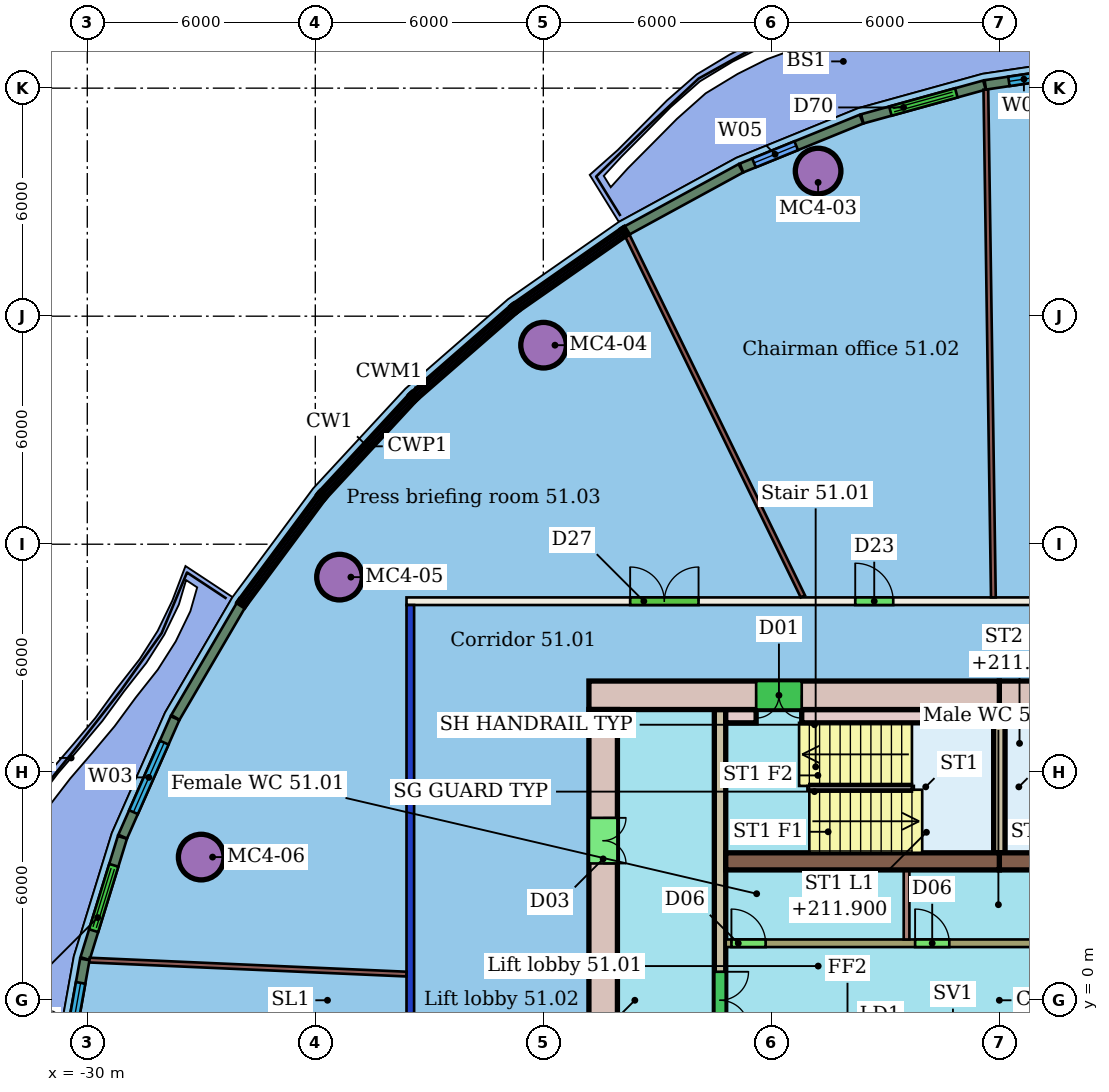
"""IFC4 building model, lengths in metres.
Left out: names, types, materials, properties, quantities, classifications, styles, units other than length and angle.
Written with IfcOpenShell. Run it as: python <this file> out.ifc"""

import sys

from ifc_helpers import new_model, si_unit, direction, frame, frame_2d, origin, origin_2d, place, context, subcontext, project, spatial, rectangle, hollow_circle, extrude, element, fill, save


model = new_model("IFC4")
c1 = context("Model", 3, precision=1e-05, world=origin(), true_north=direction((0.0, 1.0)))
c2 = subcontext(c1, "Body", "Model", "MODEL_VIEW")
j1 = project(units=[si_unit("LENGTHUNIT", "METRE"), si_unit("PLANEANGLEUNIT", "RADIAN")], contexts=[c1])
p1 = place(None, origin())
s1 = spatial("IfcSite", under=j1, at=p1, CompositionType="ELEMENT")
p2 = place(p1, origin())
s2 = spatial("IfcBuilding", under=s1, at=p2, CompositionType="ELEMENT")
p3 = place(p2, frame((0.0, 0.0, 210.1)))
s3 = spatial("IfcBuildingStorey", under=s2, at=p3, CompositionType="ELEMENT", Elevation=210.1)
for number, where, z_axis, x_axis in (
    (1, (-10.769, 21.819, 0.0), (0.0, 0.0, 1.0), (1.0, 0.0, 0.0)),
    (2, (-17.993, 17.237, 0.0), (0.0, 0.0, 1.0), (1.0, 0.0, 0.0)),
    (3, (-23.363, 11.134, 0.0), (0.0, 0.0, 1.0), (1.0, 0.0, 0.0)),
    (4, (-27.003, 3.768, 0.0), (0.0, 0.0, 1.0), (1.0, 0.0, 0.0)),
):
    element("IfcColumn", number, at=place(p3, frame(where, z_axis=z_axis, x_axis=x_axis)), inside=s3, PredefinedType="COLUMN", context=c2, shape_type="SweptSolid", body=[
        extrude(hollow_circle(Radius=0.6, WallThickness=0.045, at=origin_2d()), origin(), (0.0, 0.0, 1.0), 3.45),
    ])
p4 = place(p3, frame((-21.5, -10.4, 0.0), z_axis=(0.0, 0.0, 1.0), x_axis=(0.0, 1.0, 0.0)))
e5 = element("IfcWall", 5, at=p4, inside=s3, PredefinedType="PARTITIONING", context=c2, shape_type="SweptSolid", body=[
    extrude(rectangle(XDim=20.8, YDim=0.2, at=frame_2d((10.4, 0.0))), origin(), (0.0, 0.0, 1.0), 3.05),
])
p5 = place(p4, frame((6.277, 0.0, 0.0)))
e6 = element("IfcOpeningElement", 6, at=p5, cuts=e5, PredefinedType="OPENING", context=c2, shape_type="SweptSolid", body=[
    extrude(rectangle(XDim=1.8, YDim=2.1, at=frame_2d((0.9, 1.05))), frame((0.0, 0.11, 0.0), z_axis=(0.0, -1.0, 0.0), x_axis=(1.0, 0.0, 0.0)), (0.0, 0.0, 1.0), 0.22),
])
p6 = place(p3, frame((-21.6, 10.5, 0.0), z_axis=(0.0, 0.0, 1.0), x_axis=(1.0, 0.0, 0.0)))
e7 = element("IfcWall", 7, at=p6, inside=s3, PredefinedType="PARTITIONING", context=c2, shape_type="SweptSolid", body=[
    extrude(rectangle(XDim=31.2, YDim=0.2, at=frame_2d((15.6, 0.0))), origin(), (0.0, 0.0, 1.0), 3.45),
])
p7 = place(p6, frame((18.505, 0.0, 0.0)))
e8 = element("IfcOpeningElement", 8, at=p7, cuts=e7, PredefinedType="OPENING", context=c2, shape_type="SweptSolid", body=[
    extrude(rectangle(XDim=1.0, YDim=2.4, at=frame_2d((0.5, 1.2))), frame((0.0, 0.11, 0.0), z_axis=(0.0, -1.0, 0.0), x_axis=(1.0, 0.0, 0.0)), (0.0, 0.0, 1.0), 0.22),
])
p8 = place(p6, frame((11.808, 0.0, 0.0)))
e9 = element("IfcOpeningElement", 9, at=p8, cuts=e7, PredefinedType="OPENING", context=c2, shape_type="SweptSolid", body=[
    extrude(rectangle(XDim=1.0, YDim=2.4, at=frame_2d((0.5, 1.2))), frame((0.0, 0.11, 0.0), z_axis=(0.0, -1.0, 0.0), x_axis=(1.0, 0.0, 0.0)), (0.0, 0.0, 1.0), 0.22),
])
p9 = place(p6, frame((5.885, 0.0, 0.0)))
e10 = element("IfcOpeningElement", 10, at=p9, cuts=e7, PredefinedType="OPENING", context=c2, shape_type="SweptSolid", body=[
    extrude(rectangle(XDim=1.8, YDim=2.4, at=frame_2d((0.9, 1.2))), frame((0.0, 0.11, 0.0), z_axis=(0.0, -1.0, 0.0), x_axis=(1.0, 0.0, 0.0)), (0.0, 0.0, 1.0), 0.22),
])
p10 = place(p6, frame((23.722, 0.0, 0.0)))
e11 = element("IfcOpeningElement", 11, at=p10, cuts=e7, PredefinedType="OPENING", context=c2, shape_type="SweptSolid", body=[
    extrude(rectangle(XDim=1.8, YDim=2.1, at=frame_2d((0.9, 1.05))), frame((0.0, 0.11, 0.0), z_axis=(0.0, -1.0, 0.0), x_axis=(1.0, 0.0, 0.0)), (0.0, 0.0, 1.0), 0.22),
])
p11 = place(p3, frame((-6.355, 23.962, 0.0), z_axis=(0.0, 0.0, 1.0), x_axis=(0.014799117337, -0.999890487066, 0.0)))
e12 = element("IfcWall", 12, at=p11, inside=s3, PredefinedType="PARTITIONING", context=c2, shape_type="SweptSolid", body=[
    extrude(rectangle(XDim=13.363, YDim=0.125, at=frame_2d((6.681, 0.0))), origin(), (0.0, 0.0, 1.0), 3.45),
])
p12 = place(p3, frame((-15.789, 20.12, 0.0), z_axis=(0.0, 0.0, 1.0), x_axis=(0.437510703661, -0.899213202851, 0.0)))
e13 = element("IfcWall", 13, at=p12, inside=s3, PredefinedType="PARTITIONING", context=c2, shape_type="SweptSolid", body=[
    extrude(rectangle(XDim=10.556, YDim=0.125, at=frame_2d((5.278, 0.0))), origin(), (0.0, 0.0, 1.0), 3.45),
])
p13 = place(p3, frame((-29.941, 1.057, 0.0), z_axis=(0.0, 0.0, 1.0), x_axis=(0.999026681185, -0.044109979365, 0.0)))
e14 = element("IfcWall", 14, at=p13, inside=s3, PredefinedType="PARTITIONING", context=c2, shape_type="SweptSolid", body=[
    extrude(rectangle(XDim=8.346, YDim=0.125, at=frame_2d((4.173, 0.0))), origin(), (0.0, 0.0, 1.0), 3.45),
])
p14 = place(p3, frame((-3.15, 24.564, 0.0), z_axis=(0.0, 0.0, 1.0), x_axis=(-0.989129217208, -0.147048943092, 0.0)))
e15 = element("IfcWall", 15, at=p14, inside=s3, PredefinedType="SOLIDWALL", context=c2, shape_type="SweptSolid", body=[
    extrude(rectangle(XDim=3.254, YDim=0.25, at=frame_2d((1.627, 0.0))), origin(), (0.0, 0.0, 1.0), 3.1),
])
p15 = place(p14, frame((0.627, 0.0, 0.9)))
e16 = element("IfcOpeningElement", 16, at=p15, cuts=e15, PredefinedType="OPENING", context=c2, shape_type="SweptSolid", body=[
    extrude(rectangle(XDim=2.0, YDim=2.1, at=frame_2d((1.0, 1.05))), frame((0.0, 0.135, 0.0), z_axis=(0.0, -1.0, 0.0), x_axis=(1.0, 0.0, 0.0)), (0.0, 0.0, 1.0), 0.27),
])
p16 = place(p3, frame((-6.392, 24.081, 0.0), z_axis=(0.0, 0.0, 1.0), x_axis=(-0.963820322112, -0.266552784048, 0.0)))
e17 = element("IfcWall", 17, at=p16, inside=s3, PredefinedType="SOLIDWALL", context=c2, shape_type="SweptSolid", body=[
    extrude(rectangle(XDim=3.336, YDim=0.25, at=frame_2d((1.668, 0.0))), origin(), (0.0, 0.0, 1.0), 3.1),
])
p17 = place(p16, frame((0.768, 0.0, 0.0)))
e18 = element("IfcOpeningElement", 18, at=p17, cuts=e17, PredefinedType="OPENING", context=c2, shape_type="SweptSolid", body=[
    extrude(rectangle(XDim=1.8, YDim=2.4, at=frame_2d((0.9, 1.2))), frame((0.0, 0.135, 0.0), z_axis=(0.0, -1.0, 0.0), x_axis=(1.0, 0.0, 0.0)), (0.0, 0.0, 1.0), 0.27),
])
p18 = place(p3, frame((-9.628, 23.185, 0.0), z_axis=(0.0, 0.0, 1.0), x_axis=(-0.926160966141, -0.377128446019, 0.0)))
e19 = element("IfcWall", 19, at=p18, inside=s3, PredefinedType="SOLIDWALL", context=c2, shape_type="SweptSolid", body=[
    extrude(rectangle(XDim=3.407, YDim=0.25, at=frame_2d((1.704, 0.0))), origin(), (0.0, 0.0, 1.0), 3.1),
])
p19 = place(p18, frame((1.854, 0.0, 0.9)))
e20 = element("IfcOpeningElement", 20, at=p19, cuts=e19, PredefinedType="OPENING", context=c2, shape_type="SweptSolid", body=[
    extrude(rectangle(XDim=1.2, YDim=2.1, at=frame_2d((0.6, 1.05))), frame((0.0, 0.135, 0.0), z_axis=(0.0, -1.0, 0.0), x_axis=(1.0, 0.0, 0.0)), (0.0, 0.0, 1.0), 0.27),
])
for number, where, z_axis, x_axis in (
    (21, (-12.804, 21.89, 0.0), (0.0, 0.0, 1.0), (-0.878, -0.479, 0.0)),
    (22, (-25.956, 10.396, 0.0), (0.0, 0.0, 1.0), (-0.504, -0.863, 0.0)),
):
    element("IfcWall", number, at=place(p3, frame(where, z_axis=z_axis, x_axis=x_axis)), inside=s3, PredefinedType="SOLIDWALL", context=c2, shape_type="SweptSolid", body=[
        extrude(rectangle(XDim=3.42, YDim=0.25, at=frame_2d((1.71, 0.0))), origin(), (0.0, 0.0, 1.0), 3.1),
    ])
p20 = place(p3, frame((-27.691, 7.423, 0.0), z_axis=(0.0, 0.0, 1.0), x_axis=(-0.404116447322, -0.914707547254, 0.0)))
e23 = element("IfcWall", 23, at=p20, inside=s3, PredefinedType="SOLIDWALL", context=c2, shape_type="SweptSolid", body=[
    extrude(rectangle(XDim=3.407, YDim=0.25, at=frame_2d((1.704, 0.0))), origin(), (0.0, 0.0, 1.0), 3.1),
])
p21 = place(p20, frame((0.704, 0.0, 0.9)))
e24 = element("IfcOpeningElement", 24, at=p21, cuts=e23, PredefinedType="OPENING", context=c2, shape_type="SweptSolid", body=[
    extrude(rectangle(XDim=2.0, YDim=2.1, at=frame_2d((1.0, 1.05))), frame((0.0, 0.135, 0.0), z_axis=(0.0, -1.0, 0.0), x_axis=(1.0, 0.0, 0.0)), (0.0, 0.0, 1.0), 0.27),
])
p22 = place(p3, frame((-29.076, 4.285, 0.0), z_axis=(0.0, 0.0, 1.0), x_axis=(-0.294651514305, -0.955604774537, 0.0)))
e25 = element("IfcWall", 25, at=p22, inside=s3, PredefinedType="SOLIDWALL", context=c2, shape_type="SweptSolid", body=[
    extrude(rectangle(XDim=3.336, YDim=0.25, at=frame_2d((1.668, 0.0))), origin(), (0.0, 0.0, 1.0), 3.1),
])
p23 = place(p22, frame((0.768, 0.0, 0.0)))
e26 = element("IfcOpeningElement", 26, at=p23, cuts=e25, PredefinedType="OPENING", context=c2, shape_type="SweptSolid", body=[
    extrude(rectangle(XDim=1.8, YDim=2.4, at=frame_2d((0.9, 1.2))), frame((0.0, 0.135, 0.0), z_axis=(0.0, -1.0, 0.0), x_axis=(1.0, 0.0, 0.0)), (0.0, 0.0, 1.0), 0.27),
])
p24 = place(p3, frame((-30.065, 1.075, 0.0), z_axis=(0.0, 0.0, 1.0), x_axis=(-0.176006154206, -0.984389066214, 0.0)))
e27 = element("IfcWall", 27, at=p24, inside=s3, PredefinedType="SOLIDWALL", context=c2, shape_type="SweptSolid", body=[
    extrude(rectangle(XDim=3.254, YDim=0.25, at=frame_2d((1.627, 0.0))), origin(), (0.0, 0.0, 1.0), 3.1),
])
p25 = place(p24, frame((0.627, 0.0, 0.9)))
e28 = element("IfcOpeningElement", 28, at=p25, cuts=e27, PredefinedType="OPENING", context=c2, shape_type="SweptSolid", body=[
    extrude(rectangle(XDim=2.0, YDim=2.1, at=frame_2d((1.0, 1.05))), frame((0.0, 0.135, 0.0), z_axis=(0.0, -1.0, 0.0), x_axis=(1.0, 0.0, 0.0)), (0.0, 0.0, 1.0), 0.27),
])
p26 = place(p3, frame((4.8, 8.025, 0.0), z_axis=(0.0, 0.0, 1.0), x_axis=(-1.0, 0.0, 0.0)))
e29 = element("IfcWall", 29, at=p26, inside=s3, PredefinedType="SHEAR", context=c2, shape_type="SweptSolid", body=[
    extrude(rectangle(XDim=10.8, YDim=0.75, at=frame_2d((5.4, 0.0))), origin(), (0.0, 0.0, 1.0), 3.3),
])
p27 = place(p26, frame((4.4, 0.0, 0.0)))
e30 = element("IfcOpeningElement", 30, at=p27, cuts=e29, PredefinedType="OPENING", context=c2, shape_type="SweptSolid", body=[
    extrude(rectangle(XDim=1.2, YDim=2.1, at=frame_2d((0.6, 1.05))), frame((0.0, 0.385, 0.0), z_axis=(0.0, -1.0, 0.0), x_axis=(1.0, 0.0, 0.0)), (0.0, 0.0, 1.0), 0.77),
])
p28 = place(p3, frame((-6.0, 8.025, 0.0), z_axis=(0.0, 0.0, 1.0), x_axis=(-1.0, 0.0, 0.0)))
e31 = element("IfcWall", 31, at=p28, inside=s3, PredefinedType="SHEAR", context=c2, shape_type="SweptSolid", body=[
    extrude(rectangle(XDim=10.8, YDim=0.75, at=frame_2d((5.4, 0.0))), origin(), (0.0, 0.0, 1.0), 3.3),
])
p29 = place(p28, frame((5.2, 0.0, 0.0)))
e32 = element("IfcOpeningElement", 32, at=p29, cuts=e31, PredefinedType="OPENING", context=c2, shape_type="SweptSolid", body=[
    extrude(rectangle(XDim=1.2, YDim=2.1, at=frame_2d((0.6, 1.05))), frame((0.0, 0.385, 0.0), z_axis=(0.0, -1.0, 0.0), x_axis=(1.0, 0.0, 0.0)), (0.0, 0.0, 1.0), 0.77),
])
p30 = place(p3, frame((-16.425, 7.65, 0.0), z_axis=(0.0, 0.0, 1.0), x_axis=(0.0, -1.0, 0.0)))
e33 = element("IfcWall", 33, at=p30, inside=s3, PredefinedType="SHEAR", context=c2, shape_type="SweptSolid", body=[
    extrude(rectangle(XDim=15.3, YDim=0.75, at=frame_2d((7.65, 0.0))), origin(), (0.0, 0.0, 1.0), 3.3),
])
p31 = place(p30, frame((11.25, 0.0, 0.0)))
e34 = element("IfcOpeningElement", 34, at=p31, cuts=e33, PredefinedType="OPENING", context=c2, shape_type="SweptSolid", body=[
    extrude(rectangle(XDim=1.2, YDim=2.1, at=frame_2d((0.6, 1.05))), frame((0.0, 0.385, 0.0), z_axis=(0.0, -1.0, 0.0), x_axis=(1.0, 0.0, 0.0)), (0.0, 0.0, 1.0), 0.77),
])
p32 = place(p30, frame((2.85, 0.0, 0.0)))
e35 = element("IfcOpeningElement", 35, at=p32, cuts=e33, PredefinedType="OPENING", context=c2, shape_type="SweptSolid", body=[
    extrude(rectangle(XDim=1.2, YDim=2.1, at=frame_2d((0.6, 1.05))), frame((0.0, 0.385, 0.0), z_axis=(0.0, -1.0, 0.0), x_axis=(1.0, 0.0, 0.0)), (0.0, 0.0, 1.0), 0.77),
])
for number, where, z_axis, x_axis in (
    (36, (-13.2, 3.655, 0.0), (0.0, 0.0, 1.0), (1.0, 0.0, 0.0)),
    (37, (-6.0, 3.655, 0.0), (0.0, 0.0, 1.0), (1.0, 0.0, 0.0)),
):
    element("IfcWall", number, at=place(p3, frame(where, z_axis=z_axis, x_axis=x_axis)), inside=s3, PredefinedType="SHEAR", context=c2, shape_type="SweptSolid", body=[
        extrude(rectangle(XDim=7.2, YDim=0.45, at=frame_2d((3.6, 0.0))), origin(), (0.0, 0.0, 1.0), 3.3),
    ])
p33 = place(p3, frame((-13.35, 7.65, 0.0), z_axis=(0.0, 0.0, 1.0), x_axis=(0.0, -1.0, 0.0)))
e38 = element("IfcWall", 38, at=p33, inside=s3, PredefinedType="SHEAR", context=c2, shape_type="SweptSolid", body=[
    extrude(rectangle(XDim=15.3, YDim=0.3, at=frame_2d((7.65, 0.0))), origin(), (0.0, 0.0, 1.0), 3.3),
])
p34 = place(p33, frame((6.9, 0.0, 0.0)))
e39 = element("IfcOpeningElement", 39, at=p34, cuts=e38, PredefinedType="OPENING", context=c2, shape_type="SweptSolid", body=[
    extrude(rectangle(XDim=1.5, YDim=2.1, at=frame_2d((0.75, 1.05))), frame((0.0, 0.16, 0.0), z_axis=(0.0, -1.0, 0.0), x_axis=(1.0, 0.0, 0.0)), (0.0, 0.0, 1.0), 0.32),
])
p35 = place(p3, frame((-13.2, 1.5, 0.0), z_axis=(0.0, 0.0, 1.0), x_axis=(1.0, 0.0, 0.0)))
e40 = element("IfcWall", 40, at=p35, inside=s3, PredefinedType="SHEAR", context=c2, shape_type="SweptSolid", body=[
    extrude(rectangle(XDim=14.4, YDim=0.2, at=frame_2d((7.2, 0.0))), origin(), (0.0, 0.0, 1.0), 3.3),
])
p36 = place(p35, frame((10.312, 0.0, 0.0)))
e41 = element("IfcOpeningElement", 41, at=p36, cuts=e40, PredefinedType="OPENING", context=c2, shape_type="SweptSolid", body=[
    extrude(rectangle(XDim=1.1, YDim=2.1, at=frame_2d((0.55, 1.05))), frame((0.0, 0.11, 0.0), z_axis=(0.0, -1.0, 0.0), x_axis=(1.0, 0.0, 0.0)), (0.0, 0.0, 1.0), 0.22),
])
p37 = place(p35, frame((12.754, 0.0, 0.0)))
e42 = element("IfcOpeningElement", 42, at=p37, cuts=e40, PredefinedType="OPENING", context=c2, shape_type="SweptSolid", body=[
    extrude(rectangle(XDim=1.1, YDim=2.1, at=frame_2d((0.55, 1.05))), frame((0.0, 0.11, 0.0), z_axis=(0.0, -1.0, 0.0), x_axis=(1.0, 0.0, 0.0)), (0.0, 0.0, 1.0), 0.22),
])
p38 = place(p35, frame((0.15, 0.0, 0.0)))
e43 = element("IfcOpeningElement", 43, at=p38, cuts=e40, PredefinedType="OPENING", context=c2, shape_type="SweptSolid", body=[
    extrude(rectangle(XDim=0.9, YDim=2.1, at=frame_2d((0.45, 1.05))), frame((0.0, 0.11, 0.0), z_axis=(0.0, -1.0, 0.0), x_axis=(1.0, 0.0, 0.0)), (0.0, 0.0, 1.0), 0.22),
])
p39 = place(p35, frame((4.983, 0.0, 0.0)))
e44 = element("IfcOpeningElement", 44, at=p39, cuts=e40, PredefinedType="OPENING", context=c2, shape_type="SweptSolid", body=[
    extrude(rectangle(XDim=0.9, YDim=2.1, at=frame_2d((0.45, 1.05))), frame((0.0, 0.11, 0.0), z_axis=(0.0, -1.0, 0.0), x_axis=(1.0, 0.0, 0.0)), (0.0, 0.0, 1.0), 0.22),
])
p40 = place(p3, frame((-6.0, 3.88, 0.0), z_axis=(0.0, 0.0, 1.0), x_axis=(0.0, 1.0, 0.0)))
e45 = element("IfcWall", 45, at=p40, inside=s3, PredefinedType="SHEAR", context=c2, shape_type="SweptSolid", body=[
    extrude(rectangle(XDim=3.77, YDim=0.3, at=frame_2d((1.885, 0.0))), origin(), (0.0, 0.0, 1.0), 3.3),
])
p41 = place(p3, frame((-13.2, 7.475, 0.0), z_axis=(0.0, 0.0, 1.0), x_axis=(1.0, 0.0, 0.0)))
e46 = element("IfcWall", 46, at=p41, inside=s3, PredefinedType="SHEAR", context=c2, shape_type="SweptSolid", body=[
    extrude(rectangle(XDim=0.8, YDim=0.35, at=frame_2d((0.4, 0.0))), origin(), (0.0, 0.0, 1.0), 3.3),
])
for number, where, z_axis, x_axis in (
    (47, (-11.2, 7.475, 0.0), (0.0, 0.0, 1.0), (1.0, 0.0, 0.0)),
    (48, (-5.85, 7.475, 0.0), (0.0, 0.0, 1.0), (1.0, 0.0, 0.0)),
):
    element("IfcWall", number, at=place(p3, frame(where, z_axis=z_axis, x_axis=x_axis)), inside=s3, PredefinedType="SHEAR", context=c2, shape_type="SweptSolid", body=[
        extrude(rectangle(XDim=5.05, YDim=0.35, at=frame_2d((2.525, 0.0))), origin(), (0.0, 0.0, 1.0), 3.3),
    ])
p42 = place(p3, frame((-8.442, 1.6, 0.0), z_axis=(0.0, 0.0, 1.0), x_axis=(0.0, 1.0, 0.0)))
e49 = element("IfcWall", 49, at=p42, inside=s3, PredefinedType="PARTITIONING", context=c2, shape_type="SweptSolid", body=[
    extrude(rectangle(XDim=1.83, YDim=0.15, at=frame_2d((0.915, 0.0))), origin(), (0.0, 0.0, 1.0), 3.3),
])
p43 = place(p8, origin())
e50 = element("IfcDoor", 50, at=p43, inside=s3, OperationType="SINGLE_SWING_LEFT", PredefinedType="DOOR", context=c2, shape_type="SweptSolid", body=[
    extrude(rectangle(XDim=1.0, YDim=2.4, at=frame_2d((0.5, 1.2))), frame((0.0, 0.025, 0.0), z_axis=(0.0, -1.0, 0.0), x_axis=(1.0, 0.0, 0.0)), (0.0, 0.0, 1.0), 0.05),
])
fill(e9, e50)
p44 = place(p9, origin())
e51 = element("IfcDoor", 51, at=p44, inside=s3, OperationType="DOUBLE_DOOR_SINGLE_SWING", PredefinedType="DOOR", context=c2, shape_type="SweptSolid", body=[
    extrude(rectangle(XDim=1.8, YDim=2.4, at=frame_2d((0.9, 1.2))), frame((0.0, 0.025, 0.0), z_axis=(0.0, -1.0, 0.0), x_axis=(1.0, 0.0, 0.0)), (0.0, 0.0, 1.0), 0.05),
])
fill(e10, e51)
p45 = place(p15, origin())
e52 = element("IfcWindow", 52, at=p45, inside=s3, PartitioningType="SINGLE_PANEL", PredefinedType="WINDOW", context=c2, shape_type="SweptSolid", body=[
    extrude(rectangle(XDim=2.0, YDim=2.1, at=frame_2d((1.0, 1.05))), frame((0.0, 0.03, 0.0), z_axis=(0.0, -1.0, 0.0), x_axis=(1.0, 0.0, 0.0)), (0.0, 0.0, 1.0), 0.06),
])
fill(e16, e52)
p46 = place(p17, origin())
e53 = element("IfcDoor", 53, at=p46, inside=s3, OperationType="DOUBLE_DOOR_SLIDING", PredefinedType="DOOR", context=c2, shape_type="SweptSolid", body=[
    extrude(rectangle(XDim=1.8, YDim=2.4, at=frame_2d((0.9, 1.2))), frame((0.0, 0.025, 0.0), z_axis=(0.0, -1.0, 0.0), x_axis=(1.0, 0.0, 0.0)), (0.0, 0.0, 1.0), 0.05),
])
fill(e18, e53)
p47 = place(p19, origin())
e54 = element("IfcWindow", 54, at=p47, inside=s3, PartitioningType="SINGLE_PANEL", PredefinedType="WINDOW", context=c2, shape_type="SweptSolid", body=[
    extrude(rectangle(XDim=1.2, YDim=2.1, at=frame_2d((0.6, 1.05))), frame((0.0, 0.03, 0.0), z_axis=(0.0, -1.0, 0.0), x_axis=(1.0, 0.0, 0.0)), (0.0, 0.0, 1.0), 0.06),
])
fill(e20, e54)
p48 = place(p21, origin())
e55 = element("IfcWindow", 55, at=p48, inside=s3, PartitioningType="SINGLE_PANEL", PredefinedType="WINDOW", context=c2, shape_type="SweptSolid", body=[
    extrude(rectangle(XDim=2.0, YDim=2.1, at=frame_2d((1.0, 1.05))), frame((0.0, 0.03, 0.0), z_axis=(0.0, -1.0, 0.0), x_axis=(1.0, 0.0, 0.0)), (0.0, 0.0, 1.0), 0.06),
])
fill(e24, e55)
p49 = place(p23, origin())
e56 = element("IfcDoor", 56, at=p49, inside=s3, OperationType="DOUBLE_DOOR_SLIDING", PredefinedType="DOOR", context=c2, shape_type="SweptSolid", body=[
    extrude(rectangle(XDim=1.8, YDim=2.4, at=frame_2d((0.9, 1.2))), frame((0.0, 0.025, 0.0), z_axis=(0.0, -1.0, 0.0), x_axis=(1.0, 0.0, 0.0)), (0.0, 0.0, 1.0), 0.05),
])
fill(e26, e56)
p50 = place(p25, origin())
e57 = element("IfcWindow", 57, at=p50, inside=s3, PartitioningType="SINGLE_PANEL", PredefinedType="WINDOW", context=c2, shape_type="SweptSolid", body=[
    extrude(rectangle(XDim=2.0, YDim=2.1, at=frame_2d((1.0, 1.05))), frame((0.0, 0.03, 0.0), z_axis=(0.0, -1.0, 0.0), x_axis=(1.0, 0.0, 0.0)), (0.0, 0.0, 1.0), 0.06),
])
fill(e28, e57)
p51 = place(p29, origin())
e58 = element("IfcDoor", 58, at=p51, inside=s3, OperationType="DOUBLE_DOOR_SINGLE_SWING", PredefinedType="NOTDEFINED", context=c2, shape_type="SweptSolid", body=[
    extrude(rectangle(XDim=1.2, YDim=2.1, at=frame_2d((0.6, 1.05))), frame((0.0, 0.025, 0.0), z_axis=(0.0, -1.0, 0.0), x_axis=(1.0, 0.0, 0.0)), (0.0, 0.0, 1.0), 0.05),
])
fill(e32, e58)
p52 = place(p32, origin())
e59 = element("IfcDoor", 59, at=p52, inside=s3, OperationType="DOUBLE_DOOR_SINGLE_SWING", PredefinedType="NOTDEFINED", context=c2, shape_type="SweptSolid", body=[
    extrude(rectangle(XDim=1.2, YDim=2.1, at=frame_2d((0.6, 1.05))), frame((0.0, 0.025, 0.0), z_axis=(0.0, -1.0, 0.0), x_axis=(1.0, 0.0, 0.0)), (0.0, 0.0, 1.0), 0.05),
])
fill(e35, e59)
p53 = place(p34, origin())
e60 = element("IfcDoor", 60, at=p53, inside=s3, OperationType="DOUBLE_DOOR_SINGLE_SWING", PredefinedType="NOTDEFINED", context=c2, shape_type="SweptSolid", body=[
    extrude(rectangle(XDim=1.5, YDim=2.1, at=frame_2d((0.75, 1.05))), frame((0.0, 0.025, 0.0), z_axis=(0.0, -1.0, 0.0), x_axis=(1.0, 0.0, 0.0)), (0.0, 0.0, 1.0), 0.05),
])
fill(e39, e60)
p54 = place(p38, origin())
e61 = element("IfcDoor", 61, at=p54, inside=s3, OperationType="SINGLE_SWING_LEFT", PredefinedType="NOTDEFINED", context=c2, shape_type="SweptSolid", body=[
    extrude(rectangle(XDim=0.9, YDim=2.1, at=frame_2d((0.45, 1.05))), frame((0.0, 0.025, 0.0), z_axis=(0.0, -1.0, 0.0), x_axis=(1.0, 0.0, 0.0)), (0.0, 0.0, 1.0), 0.05),
])
fill(e43, e61)
p55 = place(p39, origin())
e62 = element("IfcDoor", 62, at=p55, inside=s3, OperationType="SINGLE_SWING_LEFT", PredefinedType="NOTDEFINED", context=c2, shape_type="SweptSolid", body=[
    extrude(rectangle(XDim=0.9, YDim=2.1, at=frame_2d((0.45, 1.05))), frame((0.0, 0.025, 0.0), z_axis=(0.0, -1.0, 0.0), x_axis=(1.0, 0.0, 0.0)), (0.0, 0.0, 1.0), 0.05),
])
fill(e44, e62)
save(model, sys.argv[1])
